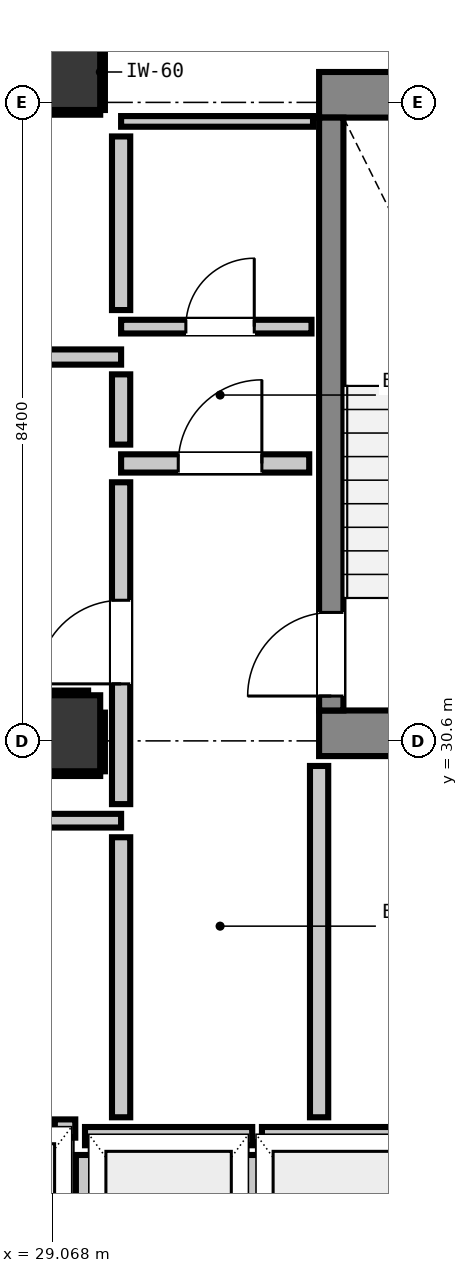
"""IFC4 building model, lengths in metres.
Left out: names, types, materials, properties, quantities, classifications, styles, units other than length and angle.
Written with IfcOpenShell. Run it as: python <this file> out.ifc"""

import sys

from ifc_helpers import new_model, si_unit, direction, frame, frame_2d, origin, origin_2d, place, context, subcontext, project, spatial, rectangle, extrude, element, fill, save


model = new_model("IFC4")
c1 = context("Model", 3, precision=1e-05, world=origin(), true_north=direction((0.0, 1.0)))
c2 = subcontext(c1, "Body", "Model", "MODEL_VIEW")
j1 = project(units=[si_unit("LENGTHUNIT", "METRE"), si_unit("PLANEANGLEUNIT", "RADIAN")], contexts=[c1])
p1 = place(None, origin())
s1 = spatial("IfcSite", under=j1, at=p1, CompositionType="ELEMENT")
p2 = place(p1, origin())
s2 = spatial("IfcBuilding", under=s1, at=p2, CompositionType="ELEMENT")
p3 = place(p2, frame((0.0, 0.0, 51.88)))
s3 = spatial("IfcBuildingStorey", under=s2, at=p3, CompositionType="ELEMENT", Elevation=51.88)
p4 = place(p3, frame((29.2, 39.4, 0.0), z_axis=(0.0, 0.0, 1.0), x_axis=(1.0, 0.0, 0.0)))
e1 = element("IfcColumn", 1, at=p4, inside=s3, PredefinedType="COLUMN", context=c2, shape_type="SweptSolid", body=[
    extrude(rectangle(XDim=1.0, YDim=1.0, at=origin_2d()), origin(), (0.0, 0.0, 1.0), 3.32),
])
p5 = place(p3, frame((32.58, 39.1, 0.0), z_axis=(0.0, 0.0, 1.0), x_axis=(1.0, 0.0, 0.0)))
e2 = element("IfcWall", 2, at=p5, inside=s3, PredefinedType="SHEAR", context=c2, shape_type="SweptSolid", body=[
    extrude(rectangle(XDim=4.08, YDim=0.6, at=frame_2d((2.04, 0.0))), origin(), (0.0, 0.0, 1.0), 3.32),
])
p6 = place(p3, frame((32.58, 30.7, 0.0), z_axis=(0.0, 0.0, 1.0), x_axis=(1.0, 0.0, 0.0)))
e3 = element("IfcWall", 3, at=p6, inside=s3, PredefinedType="SHEAR", context=c2, shape_type="SweptSolid", body=[
    extrude(rectangle(XDim=3.415, YDim=0.6, at=frame_2d((1.708, 0.0))), origin(), (0.0, 0.0, 1.0), 3.32),
])
p7 = place(p3, frame((32.74, 31.0, 0.0), z_axis=(0.0, 0.0, 1.0), x_axis=(0.0, 1.0, 0.0)))
e4 = element("IfcWall", 4, at=p7, inside=s3, PredefinedType="SHEAR", context=c2, shape_type="SweptSolid", body=[
    extrude(rectangle(XDim=7.8, YDim=0.32, at=frame_2d((3.9, 0.0))), origin(), (0.0, 0.0, 1.0), 3.32),
])
p8 = place(p7, frame((0.19, 0.0, 0.0)))
e5 = element("IfcOpeningElement", 5, at=p8, cuts=e4, PredefinedType="OPENING", context=c2, shape_type="SweptSolid", body=[
    extrude(rectangle(XDim=1.1, YDim=2.15, at=frame_2d((0.55, 1.075))), frame((0.0, 0.17, 0.0), z_axis=(0.0, -1.0, 0.0), x_axis=(1.0, 0.0, 0.0)), (0.0, 0.0, 1.0), 0.34),
])
p9 = place(p3, frame((29.2, 30.7, 0.0), z_axis=(0.0, 0.0, 1.0), x_axis=(1.0, 0.0, 0.0)))
e6 = element("IfcColumn", 6, at=p9, inside=s3, PredefinedType="COLUMN", context=c2, shape_type="SweptSolid", body=[
    extrude(rectangle(XDim=1.0, YDim=1.0, at=origin_2d()), origin(), (0.0, 0.0, 1.0), 3.32),
])
p10 = place(p3, frame((29.5, 25.4, 0.0), z_axis=(0.0, 0.0, 1.0), x_axis=(1.0, 0.0, 0.0)))
e7 = element("IfcWall", 7, at=p10, inside=s3, PredefinedType="PARTITIONING", context=c2, shape_type="SweptSolid", body=[
    extrude(rectangle(XDim=2.2, YDim=0.24, at=frame_2d((1.1, 0.0))), origin(), (0.0, 0.0, 1.0), 3.06),
])
p11 = place(p3, frame((29.5, 22.632, 0.0), z_axis=(0.0, 0.0, 1.0), x_axis=(0.0, 1.0, 0.0)))
e8 = element("IfcWall", 8, at=p11, inside=s3, PredefinedType="PARTITIONING", context=c2, shape_type="SweptSolid", body=[
    extrude(rectangle(XDim=2.52, YDim=0.24, at=frame_2d((1.26, 0.0))), origin(), (0.0, 0.0, 1.0), 2.295),
])
p12 = place(p3, frame((31.7, 22.73, 0.0), z_axis=(0.0, 0.0, 1.0), x_axis=(0.0, 1.0, 0.0)))
e9 = element("IfcWall", 9, at=p12, inside=s3, PredefinedType="PARTITIONING", context=c2, shape_type="SweptSolid", body=[
    extrude(rectangle(XDim=2.422, YDim=0.24, at=frame_2d((1.211, 0.0))), origin(), (0.0, 0.0, 1.0), 3.06),
])
p13 = place(p3, frame((31.828, 25.4, 0.0), z_axis=(0.0, 0.0, 1.0), x_axis=(1.0, 0.0, 0.0)))
e10 = element("IfcWall", 10, at=p13, inside=s3, PredefinedType="PARTITIONING", context=c2, shape_type="SweptSolid", body=[
    extrude(rectangle(XDim=2.072, YDim=0.24, at=frame_2d((1.036, 0.0))), origin(), (0.0, 0.0, 1.0), 3.06),
])
p14 = place(p3, frame((29.103, 25.5, 0.0), z_axis=(0.0, 0.0, 1.0), x_axis=(1.0, 0.0, 0.0)))
e11 = element("IfcWall", 11, at=p14, inside=s3, PredefinedType="PARTITIONING", context=c2, shape_type="SweptSolid", body=[
    extrude(rectangle(XDim=0.269, YDim=0.24, at=frame_2d((0.135, 0.0))), origin(), (0.0, 0.0, 1.0), 3.06),
])
p15 = place(p3, frame((29.975, 34.25, 0.0), z_axis=(0.0, 0.0, 1.0), x_axis=(1.0, 0.0, 0.0)))
e12 = element("IfcWall", 12, at=p15, inside=s3, PredefinedType="PARTITIONING", context=c2, shape_type="SweptSolid", body=[
    extrude(rectangle(XDim=2.475, YDim=0.24, at=frame_2d((1.237, 0.0))), origin(), (0.0, 0.0, 1.0), 3.06),
])
p16 = place(p15, frame((0.752, 0.0, 0.0)))
e13 = element("IfcOpeningElement", 13, at=p16, cuts=e12, PredefinedType="OPENING", context=c2, shape_type="SweptSolid", body=[
    extrude(rectangle(XDim=1.1, YDim=2.15, at=frame_2d((0.55, 1.075))), frame((0.0, 0.13, 0.0), z_axis=(0.0, -1.0, 0.0), x_axis=(1.0, 0.0, 0.0)), (0.0, 0.0, 1.0), 0.26),
])
p17 = place(p3, frame((28.604, 35.65, 0.0), z_axis=(0.0, 0.0, 1.0), x_axis=(1.0, 0.0, 0.0)))
e14 = element("IfcWall", 14, at=p17, inside=s3, PredefinedType="PARTITIONING", context=c2, shape_type="SweptSolid", body=[
    extrude(rectangle(XDim=1.371, YDim=0.2, at=frame_2d((0.686, 0.0))), origin(), (0.0, 0.0, 1.0), 3.06),
])
p18 = place(p3, frame((20.65, 29.55, 0.0), z_axis=(0.0, 0.0, 1.0), x_axis=(1.0, 0.0, 0.0)))
e15 = element("IfcWall", 15, at=p18, inside=s3, PredefinedType="PARTITIONING", context=c2, shape_type="SweptSolid", body=[
    extrude(rectangle(XDim=9.325, YDim=0.18, at=frame_2d((4.663, 0.0))), origin(), (0.0, 0.0, 1.0), 3.06),
])
p19 = place(p3, frame((29.975, 36.05, 0.0), z_axis=(0.0, 0.0, 1.0), x_axis=(1.0, 0.0, 0.0)))
e16 = element("IfcWall", 16, at=p19, inside=s3, PredefinedType="PARTITIONING", context=c2, shape_type="SweptSolid", body=[
    extrude(rectangle(XDim=2.505, YDim=0.18, at=frame_2d((1.252, 0.0))), origin(), (0.0, 0.0, 1.0), 3.06),
])
p20 = place(p19, frame((0.852, 0.0, 0.0)))
e17 = element("IfcOpeningElement", 17, at=p20, cuts=e16, PredefinedType="OPENING", context=c2, shape_type="SweptSolid", body=[
    extrude(rectangle(XDim=0.9, YDim=2.1, at=frame_2d((0.45, 1.05))), frame((0.0, 0.1, 0.0), z_axis=(0.0, -1.0, 0.0), x_axis=(1.0, 0.0, 0.0)), (0.0, 0.0, 1.0), 0.2),
])
p21 = place(p3, frame((29.975, 38.75, 0.0), z_axis=(0.0, 0.0, 1.0), x_axis=(1.0, 0.0, 0.0)))
e18 = element("IfcWall", 18, at=p21, inside=s3, PredefinedType="PARTITIONING", context=c2, shape_type="SweptSolid", body=[
    extrude(rectangle(XDim=2.525, YDim=0.14, at=frame_2d((1.262, 0.0))), origin(), (0.0, 0.0, 1.0), 3.06),
])
p22 = place(p3, frame((29.975, 25.648, 0.0), z_axis=(0.0, 0.0, 1.0), x_axis=(0.0, 1.0, 0.0)))
e19 = element("IfcWall", 19, at=p22, inside=s3, PredefinedType="PARTITIONING", context=c2, shape_type="SweptSolid", body=[
    extrude(rectangle(XDim=3.684, YDim=0.24, at=frame_2d((1.842, 0.0))), origin(), (0.0, 0.0, 1.0), 3.06),
])
p23 = place(p3, frame((29.975, 29.768, 0.0), z_axis=(0.0, 0.0, 1.0), x_axis=(0.0, 1.0, 0.0)))
e20 = element("IfcWall", 20, at=p23, inside=s3, PredefinedType="PARTITIONING", context=c2, shape_type="SweptSolid", body=[
    extrude(rectangle(XDim=4.234, YDim=0.24, at=frame_2d((2.117, 0.0))), origin(), (0.0, 0.0, 1.0), 3.06),
])
p24 = place(p23, frame((1.582, 0.0, 0.0)))
e21 = element("IfcOpeningElement", 21, at=p24, cuts=e20, PredefinedType="OPENING", context=c2, shape_type="SweptSolid", body=[
    extrude(rectangle(XDim=1.1, YDim=2.15, at=frame_2d((0.55, 1.075))), frame((0.0, 0.13, 0.0), z_axis=(0.0, -1.0, 0.0), x_axis=(1.0, 0.0, 0.0)), (0.0, 0.0, 1.0), 0.26),
])
p25 = place(p3, frame((29.975, 34.498, 0.0), z_axis=(0.0, 0.0, 1.0), x_axis=(0.0, 1.0, 0.0)))
e22 = element("IfcWall", 22, at=p25, inside=s3, PredefinedType="PARTITIONING", context=c2, shape_type="SweptSolid", body=[
    extrude(rectangle(XDim=0.924, YDim=0.24, at=frame_2d((0.462, 0.0))), origin(), (0.0, 0.0, 1.0), 3.06),
])
p26 = place(p3, frame((29.975, 36.268, 0.0), z_axis=(0.0, 0.0, 1.0), x_axis=(0.0, 1.0, 0.0)))
e23 = element("IfcWall", 23, at=p26, inside=s3, PredefinedType="PARTITIONING", context=c2, shape_type="SweptSolid", body=[
    extrude(rectangle(XDim=2.284, YDim=0.24, at=frame_2d((1.142, 0.0))), origin(), (0.0, 0.0, 1.0), 3.06),
])
p27 = place(p3, frame((32.58, 25.648, 0.0), z_axis=(0.0, 0.0, 1.0), x_axis=(0.0, 1.0, 0.0)))
e24 = element("IfcWall", 24, at=p27, inside=s3, PredefinedType="PARTITIONING", context=c2, shape_type="SweptSolid", body=[
    extrude(rectangle(XDim=4.622, YDim=0.24, at=frame_2d((2.311, 0.0))), origin(), (0.0, 0.0, 1.0), 3.06),
])
p28 = place(p3, frame((28.71, 38.868, 0.0), z_axis=(0.0, 0.0, 1.0), x_axis=(1.0, 0.0, 0.0)))
e25 = element("IfcWall", 25, at=p28, inside=s3, PredefinedType="PARTITIONING", context=c2, shape_type="SweptSolid", body=[
    extrude(rectangle(XDim=0.99, YDim=0.06, at=frame_2d((0.495, 0.0))), origin(), (0.0, 0.0, 1.0), 1.45),
])
for number, where, z_axis, x_axis in (
    (26, (29.732, 38.9, 0.0), (0.0, 0.0, 1.0), (0.0, 1.0, 0.0)),
    (27, (28.7, 30.168, 0.0), (0.0, 0.0, 1.0), (1.0, 0.0, 0.0)),
):
    element("IfcWall", number, at=place(p3, frame(where, z_axis=z_axis, x_axis=x_axis)), inside=s3, PredefinedType="PARTITIONING", context=c2, shape_type="SweptSolid", body=[
        extrude(rectangle(XDim=1.0, YDim=0.06, at=frame_2d((0.5, 0.0))), origin(), (0.0, 0.0, 1.0), 1.45),
    ])
p29 = place(p3, frame((28.7, 31.232, 0.0), z_axis=(0.0, 0.0, 1.0), x_axis=(1.0, 0.0, 0.0)))
e28 = element("IfcWall", 28, at=p29, inside=s3, PredefinedType="PARTITIONING", context=c2, shape_type="SweptSolid", body=[
    extrude(rectangle(XDim=0.841, YDim=0.06, at=frame_2d((0.42, 0.0))), origin(), (0.0, 0.0, 1.0), 1.45),
])
p30 = place(p3, frame((29.732, 30.2, 0.0), z_axis=(0.0, 0.0, 1.0), x_axis=(0.0, 1.0, 0.0)))
e29 = element("IfcWall", 29, at=p30, inside=s3, PredefinedType="PARTITIONING", context=c2, shape_type="SweptSolid", body=[
    extrude(rectangle(XDim=0.772, YDim=0.06, at=frame_2d((0.386, 0.0))), origin(), (0.0, 0.0, 1.0), 1.45),
])
p31 = place(p8, origin())
e30 = element("IfcDoor", 30, at=p31, inside=s3, OperationType="SINGLE_SWING_LEFT", PredefinedType="DOOR", context=c2, shape_type="SweptSolid", body=[
    extrude(rectangle(XDim=1.1, YDim=2.15, at=frame_2d((0.55, 1.075))), frame((0.0, 0.025, 0.0), z_axis=(0.0, -1.0, 0.0), x_axis=(1.0, 0.0, 0.0)), (0.0, 0.0, 1.0), 0.05),
])
fill(e5, e30)
p32 = place(p24, origin())
e31 = element("IfcDoor", 31, at=p32, inside=s3, OperationType="SINGLE_SWING_LEFT", PredefinedType="DOOR", context=c2, shape_type="SweptSolid", body=[
    extrude(rectangle(XDim=1.1, YDim=2.15, at=frame_2d((0.55, 1.075))), frame((0.0, 0.025, 0.0), z_axis=(0.0, -1.0, 0.0), x_axis=(1.0, 0.0, 0.0)), (0.0, 0.0, 1.0), 0.05),
])
fill(e21, e31)
p33 = place(p16, origin())
e32 = element("IfcDoor", 32, at=p33, inside=s3, OperationType="SINGLE_SWING_RIGHT", PredefinedType="DOOR", context=c2, shape_type="SweptSolid", body=[
    extrude(rectangle(XDim=1.1, YDim=2.15, at=frame_2d((0.55, 1.075))), frame((0.0, 0.025, 0.0), z_axis=(0.0, -1.0, 0.0), x_axis=(1.0, 0.0, 0.0)), (0.0, 0.0, 1.0), 0.05),
])
fill(e13, e32)
p34 = place(p20, origin())
e33 = element("IfcDoor", 33, at=p34, inside=s3, OperationType="SINGLE_SWING_RIGHT", PredefinedType="DOOR", context=c2, shape_type="SweptSolid", body=[
    extrude(rectangle(XDim=0.9, YDim=2.1, at=frame_2d((0.45, 1.05))), frame((0.0, 0.025, 0.0), z_axis=(0.0, -1.0, 0.0), x_axis=(1.0, 0.0, 0.0)), (0.0, 0.0, 1.0), 0.05),
])
fill(e17, e33)
save(model, sys.argv[1])
